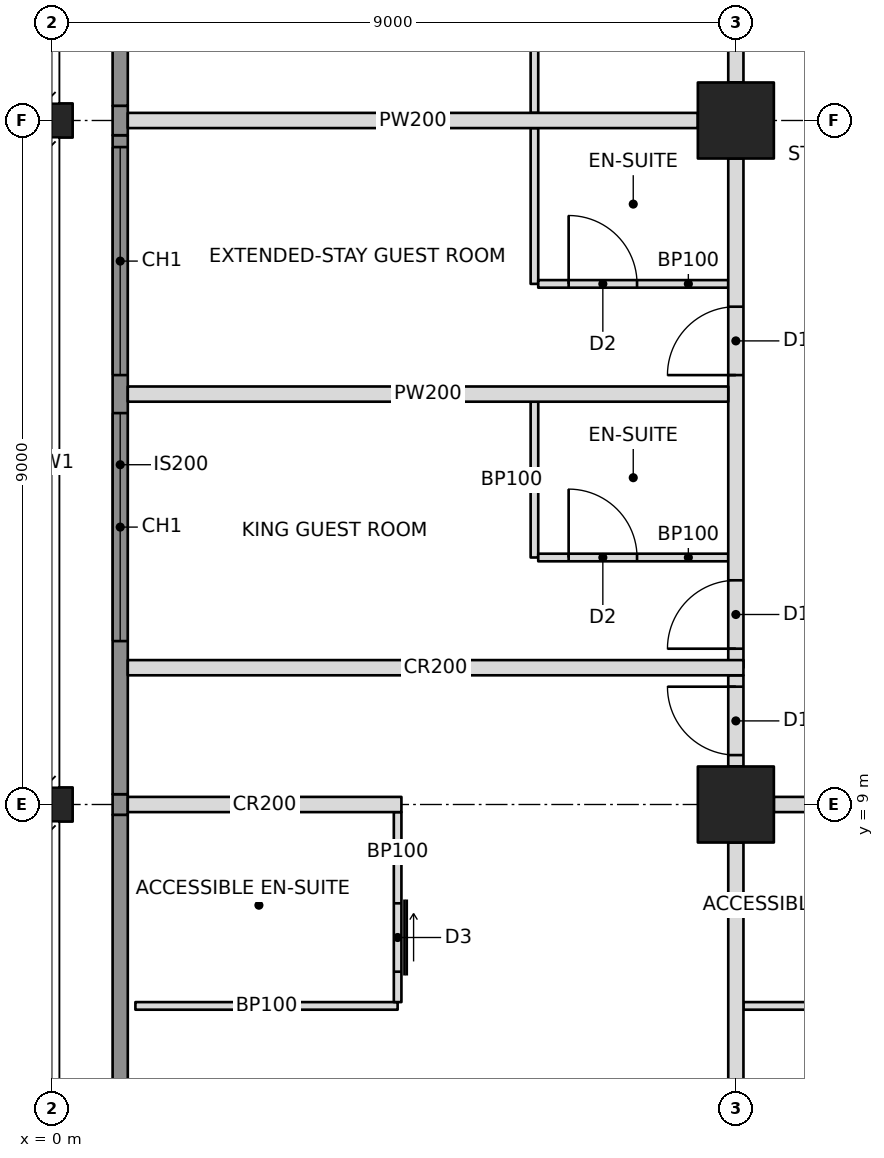
"""IFC4 building model, lengths in metres.
Left out: names, types, materials, properties, quantities, classifications, styles, units other than length and angle.
Written with IfcOpenShell. Run it as: python <this file> out.ifc"""

import sys

from ifc_helpers import new_model, si_unit, direction, frame, frame_2d, origin, origin_2d, place, context, subcontext, project, spatial, rectangle, hollow_rectangle, i_section, extrude, element, fill, save


model = new_model("IFC4")
c1 = context("Model", 3, precision=1e-05, world=origin(), true_north=direction((0.0, 1.0)))
c2 = subcontext(c1, "Body", "Model", "MODEL_VIEW")
j1 = project(units=[si_unit("LENGTHUNIT", "METRE"), si_unit("PLANEANGLEUNIT", "RADIAN")], contexts=[c1])
p1 = place(None, origin())
s1 = spatial("IfcSite", under=j1, at=p1, CompositionType="ELEMENT")
p2 = place(p1, origin())
s2 = spatial("IfcBuilding", under=s1, at=p2, CompositionType="ELEMENT")
p3 = place(p2, frame((0.0, 0.0, 163.8)))
s3 = spatial("IfcBuildingStorey", under=s2, at=p3, CompositionType="ELEMENT", Elevation=163.8)
for number, where, z_axis, x_axis in (
    (1, (0.0, 9.0, 0.0), (0.0, 0.0, 1.0), (0.0, 1.0, 0.0)),
    (2, (0.0, 18.0, 0.0), (0.0, 0.0, 1.0), (0.0, 1.0, 0.0)),
):
    element("IfcColumn", number, at=place(p3, frame(where, z_axis=z_axis, x_axis=x_axis)), inside=s3, PredefinedType="COLUMN", context=c2, shape_type="SweptSolid", body=[
        extrude(i_section(OverallWidth=0.449, OverallDepth=0.549, WebThickness=0.072, FlangeThickness=0.115, at=origin_2d()), origin(), (0.0, 0.0, 1.0), 3.4),
    ])
for number, where, z_axis, x_axis in (
    (3, (9.0, 9.0, 0.0), (0.0, 0.0, 1.0), (1.0, 0.0, 0.0)),
    (4, (9.0, 18.0, 0.0), (0.0, 0.0, 1.0), (1.0, 0.0, 0.0)),
):
    element("IfcColumn", number, at=place(p3, frame(where, z_axis=z_axis, x_axis=x_axis)), inside=s3, PredefinedType="COLUMN", context=c2, shape_type="SweptSolid", body=[
        extrude(hollow_rectangle(XDim=1.0, YDim=1.0, WallThickness=0.1, at=origin_2d()), origin(), (0.0, 0.0, 1.0), 3.4),
    ])
p4 = place(p3, frame((1.0, 9.0, 0.0), z_axis=(0.0, 0.0, 1.0), x_axis=(1.0, 0.0, 0.0)))
e5 = element("IfcWall", 5, at=p4, inside=s3, PredefinedType="PARTITIONING", context=c2, shape_type="SweptSolid", body=[
    extrude(rectangle(XDim=3.6, YDim=0.2, at=frame_2d((1.8, 0.0))), origin(), (0.0, 0.0, 1.0), 2.438),
])
p5 = place(p3, frame((9.5, 9.0, 0.0), z_axis=(0.0, 0.0, 1.0), x_axis=(1.0, 0.0, 0.0)))
e6 = element("IfcWall", 6, at=p5, inside=s3, PredefinedType="PARTITIONING", context=c2, shape_type="SweptSolid", body=[
    extrude(rectangle(XDim=8.0, YDim=0.2, at=frame_2d((4.0, 0.0))), origin(), (0.0, 0.0, 1.0), 2.405),
])
p6 = place(p5, frame((2.85, 0.0, 0.0)))
e7 = element("IfcOpeningElement", 7, at=p6, cuts=e6, PredefinedType="OPENING", context=c2, shape_type="SweptSolid", body=[
    extrude(rectangle(XDim=0.9, YDim=2.1, at=frame_2d((0.45, 1.05))), frame((0.0, 0.11, 0.0), z_axis=(0.0, -1.0, 0.0), x_axis=(1.0, 0.0, 0.0)), (0.0, 0.0, 1.0), 0.22),
])
p7 = place(p5, frame((4.25, 0.0, 0.0)))
e8 = element("IfcOpeningElement", 8, at=p7, cuts=e6, PredefinedType="OPENING", context=c2, shape_type="SweptSolid", body=[
    extrude(rectangle(XDim=0.9, YDim=2.1, at=frame_2d((0.45, 1.05))), frame((0.0, 0.11, 0.0), z_axis=(0.0, -1.0, 0.0), x_axis=(1.0, 0.0, 0.0)), (0.0, 0.0, 1.0), 0.22),
])
p8 = place(p3, frame((9.0, 10.8, 0.0), z_axis=(0.0, 0.0, 1.0), x_axis=(0.0, 1.0, 0.0)))
e9 = element("IfcWall", 9, at=p8, inside=s3, PredefinedType="PARTITIONING", context=c2, shape_type="SweptSolid", body=[
    extrude(rectangle(XDim=6.7, YDim=0.2, at=frame_2d((3.35, 0.0))), origin(), (0.0, 0.0, 1.0), 2.405),
])
p9 = place(p8, frame((0.25, 0.0, 0.0)))
e10 = element("IfcOpeningElement", 10, at=p9, cuts=e9, PredefinedType="OPENING", context=c2, shape_type="SweptSolid", body=[
    extrude(rectangle(XDim=0.9, YDim=2.1, at=frame_2d((0.45, 1.05))), frame((0.0, 0.11, 0.0), z_axis=(0.0, -1.0, 0.0), x_axis=(1.0, 0.0, 0.0)), (0.0, 0.0, 1.0), 0.22),
])
p10 = place(p8, frame((3.85, 0.0, 0.0)))
e11 = element("IfcOpeningElement", 11, at=p10, cuts=e9, PredefinedType="OPENING", context=c2, shape_type="SweptSolid", body=[
    extrude(rectangle(XDim=0.9, YDim=2.1, at=frame_2d((0.45, 1.05))), frame((0.0, 0.11, 0.0), z_axis=(0.0, -1.0, 0.0), x_axis=(1.0, 0.0, 0.0)), (0.0, 0.0, 1.0), 0.22),
])
p11 = place(p3, frame((9.0, 18.5, 0.0), z_axis=(0.0, 0.0, 1.0), x_axis=(0.0, 1.0, 0.0)))
e12 = element("IfcWall", 12, at=p11, inside=s3, PredefinedType="PARTITIONING", context=c2, shape_type="SweptSolid", body=[
    extrude(rectangle(XDim=8.1, YDim=0.2, at=frame_2d((4.05, 0.0))), origin(), (0.0, 0.0, 1.0), 2.405),
])
p12 = place(p11, frame((5.55, 0.0, 0.0)))
e13 = element("IfcOpeningElement", 13, at=p12, cuts=e12, PredefinedType="OPENING", context=c2, shape_type="SweptSolid", body=[
    extrude(rectangle(XDim=0.9, YDim=2.1, at=frame_2d((0.45, 1.05))), frame((0.0, 0.11, 0.0), z_axis=(0.0, -1.0, 0.0), x_axis=(1.0, 0.0, 0.0)), (0.0, 0.0, 1.0), 0.22),
])
p13 = place(p3, frame((1.0, 10.8, 0.0), z_axis=(0.0, 0.0, 1.0), x_axis=(1.0, 0.0, 0.0)))
e14 = element("IfcWall", 14, at=p13, inside=s3, PredefinedType="PARTITIONING", context=c2, shape_type="SweptSolid", body=[
    extrude(rectangle(XDim=8.1, YDim=0.2, at=frame_2d((4.05, 0.0))), origin(), (0.0, 0.0, 1.0), 2.404),
])
p14 = place(p3, frame((9.0, 8.5, 0.0), z_axis=(0.0, 0.0, 1.0), x_axis=(0.0, -1.0, 0.0)))
e15 = element("IfcWall", 15, at=p14, inside=s3, PredefinedType="PARTITIONING", context=c2, shape_type="SweptSolid", body=[
    extrude(rectangle(XDim=7.5, YDim=0.2, at=frame_2d((3.75, 0.0))), origin(), (0.0, 0.0, 1.0), 2.438),
])
p15 = place(p3, frame((1.1, 6.35, 0.0), z_axis=(0.0, 0.0, 1.0), x_axis=(1.0, 0.0, 0.0)))
e16 = element("IfcWall", 16, at=p15, inside=s3, PredefinedType="PARTITIONING", context=c2, shape_type="SweptSolid", body=[
    extrude(rectangle(XDim=3.45, YDim=0.1, at=frame_2d((1.725, 0.0))), origin(), (0.0, 0.0, 1.0), 3.2),
])
p16 = place(p3, frame((4.55, 8.9, 0.0), z_axis=(0.0, 0.0, 1.0), x_axis=(0.0, -1.0, 0.0)))
e17 = element("IfcWall", 17, at=p16, inside=s3, PredefinedType="PARTITIONING", context=c2, shape_type="SweptSolid", body=[
    extrude(rectangle(XDim=2.5, YDim=0.1, at=frame_2d((1.25, 0.0))), origin(), (0.0, 0.0, 1.0), 2.438),
])
p17 = place(p16, frame((1.2, 0.0, 0.0)))
e18 = element("IfcOpeningElement", 18, at=p17, cuts=e17, PredefinedType="OPENING", context=c2, shape_type="SweptSolid", body=[
    extrude(rectangle(XDim=0.9, YDim=2.1, at=frame_2d((0.45, 1.05))), frame((0.0, 0.06, 0.0), z_axis=(0.0, -1.0, 0.0), x_axis=(1.0, 0.0, 0.0)), (0.0, 0.0, 1.0), 0.12),
])
p18 = place(p3, frame((9.1, 6.35, 0.0), z_axis=(0.0, 0.0, 1.0), x_axis=(1.0, 0.0, 0.0)))
e19 = element("IfcWall", 19, at=p18, inside=s3, PredefinedType="PARTITIONING", context=c2, shape_type="SweptSolid", body=[
    extrude(rectangle(XDim=2.95, YDim=0.1, at=frame_2d((1.475, 0.0))), origin(), (0.0, 0.0, 1.0), 2.438),
])
p19 = place(p3, frame((8.9, 14.4, 0.0), z_axis=(0.0, 0.0, 1.0), x_axis=(-1.0, 0.0, 0.0)))
e20 = element("IfcWall", 20, at=p19, inside=s3, PredefinedType="PARTITIONING", context=c2, shape_type="SweptSolid", body=[
    extrude(rectangle(XDim=7.9, YDim=0.2, at=frame_2d((3.95, 0.0))), origin(), (0.0, 0.0, 1.0), 2.404),
])
p20 = place(p3, frame((8.5, 18.0, 0.0), z_axis=(0.0, 0.0, 1.0), x_axis=(-1.0, 0.0, 0.0)))
e21 = element("IfcWall", 21, at=p20, inside=s3, PredefinedType="PARTITIONING", context=c2, shape_type="SweptSolid", body=[
    extrude(rectangle(XDim=7.5, YDim=0.2, at=frame_2d((3.75, 0.0))), origin(), (0.0, 0.0, 1.0), 2.405),
])
p21 = place(p3, frame((6.35, 12.25, 0.0), z_axis=(0.0, 0.0, 1.0), x_axis=(0.0, 1.0, 0.0)))
e22 = element("IfcWall", 22, at=p21, inside=s3, PredefinedType="PARTITIONING", context=c2, shape_type="SweptSolid", body=[
    extrude(rectangle(XDim=2.05, YDim=0.1, at=frame_2d((1.025, 0.0))), origin(), (0.0, 0.0, 1.0), 3.2),
])
p22 = place(p3, frame((8.9, 12.25, 0.0), z_axis=(0.0, 0.0, 1.0), x_axis=(-1.0, 0.0, 0.0)))
e23 = element("IfcWall", 23, at=p22, inside=s3, PredefinedType="PARTITIONING", context=c2, shape_type="SweptSolid", body=[
    extrude(rectangle(XDim=2.5, YDim=0.1, at=frame_2d((1.25, 0.0))), origin(), (0.0, 0.0, 1.0), 2.404),
])
p23 = place(p22, frame((1.2, 0.0, 0.0)))
e24 = element("IfcOpeningElement", 24, at=p23, cuts=e23, PredefinedType="OPENING", context=c2, shape_type="SweptSolid", body=[
    extrude(rectangle(XDim=0.9, YDim=2.1, at=frame_2d((0.45, 1.05))), frame((0.0, 0.06, 0.0), z_axis=(0.0, -1.0, 0.0), x_axis=(1.0, 0.0, 0.0)), (0.0, 0.0, 1.0), 0.12),
])
p24 = place(p3, frame((6.35, 15.85, 0.0), z_axis=(0.0, 0.0, 1.0), x_axis=(0.0, 1.0, 0.0)))
e25 = element("IfcWall", 25, at=p24, inside=s3, PredefinedType="PARTITIONING", context=c2, shape_type="SweptSolid", body=[
    extrude(rectangle(XDim=2.05, YDim=0.1, at=frame_2d((1.025, 0.0))), origin(), (0.0, 0.0, 1.0), 2.404),
])
p25 = place(p3, frame((8.9, 15.85, 0.0), z_axis=(0.0, 0.0, 1.0), x_axis=(-1.0, 0.0, 0.0)))
e26 = element("IfcWall", 26, at=p25, inside=s3, PredefinedType="PARTITIONING", context=c2, shape_type="SweptSolid", body=[
    extrude(rectangle(XDim=2.5, YDim=0.1, at=frame_2d((1.25, 0.0))), origin(), (0.0, 0.0, 1.0), 2.404),
])
p26 = place(p25, frame((1.2, 0.0, 0.0)))
e27 = element("IfcOpeningElement", 27, at=p26, cuts=e26, PredefinedType="OPENING", context=c2, shape_type="SweptSolid", body=[
    extrude(rectangle(XDim=0.9, YDim=2.1, at=frame_2d((0.45, 1.05))), frame((0.0, 0.06, 0.0), z_axis=(0.0, -1.0, 0.0), x_axis=(1.0, 0.0, 0.0)), (0.0, 0.0, 1.0), 0.12),
])
p27 = place(p3, frame((6.35, 18.1, 0.0), z_axis=(0.0, 0.0, 1.0), x_axis=(0.0, 1.0, 0.0)))
e28 = element("IfcWall", 28, at=p27, inside=s3, PredefinedType="PARTITIONING", context=c2, shape_type="SweptSolid", body=[
    extrude(rectangle(XDim=3.45, YDim=0.1, at=frame_2d((1.725, 0.0))), origin(), (0.0, 0.0, 1.0), 2.404),
])
p28 = place(p3, frame((9.0, 9.5, 0.0), z_axis=(0.0, 0.0, 1.0), x_axis=(0.0, 1.0, 0.0)))
e29 = element("IfcWall", 29, at=p28, inside=s3, PredefinedType="PARTITIONING", context=c2, shape_type="SweptSolid", body=[
    extrude(rectangle(XDim=1.2, YDim=0.2, at=frame_2d((0.6, 0.0))), origin(), (0.0, 0.0, 1.0), 2.405),
])
p29 = place(p28, frame((0.15, 0.0, 0.0)))
e30 = element("IfcOpeningElement", 30, at=p29, cuts=e29, PredefinedType="OPENING", context=c2, shape_type="SweptSolid", body=[
    extrude(rectangle(XDim=0.9, YDim=2.1, at=frame_2d((0.45, 1.05))), frame((0.0, 0.11, 0.0), z_axis=(0.0, -1.0, 0.0), x_axis=(1.0, 0.0, 0.0)), (0.0, 0.0, 1.0), 0.22),
])
p30 = place(p3, frame((0.9, 4.607, 0.0), z_axis=(0.0, 0.0, 1.0), x_axis=(0.0, 1.0, 0.0)))
e31 = element("IfcWall", 31, at=p30, inside=s3, PredefinedType="SOLIDWALL", context=c2, shape_type="SweptSolid", body=[
    extrude(rectangle(XDim=4.257, YDim=0.2, at=frame_2d((2.129, 0.0))), origin(), (0.0, 0.0, 1.0), 3.2),
])
p31 = place(p3, frame((0.9, 8.865, 0.0), z_axis=(0.0, 0.0, 1.0), x_axis=(0.0, 1.0, 0.0)))
e32 = element("IfcWall", 32, at=p31, inside=s3, PredefinedType="SOLIDWALL", context=c2, shape_type="SweptSolid", body=[
    extrude(rectangle(XDim=0.271, YDim=0.2, at=frame_2d((0.135, 0.0))), origin(), (0.0, 0.0, 1.0), 2.438),
])
p32 = place(p3, frame((0.9, 9.135, 0.0), z_axis=(0.0, 0.0, 1.0), x_axis=(0.0, 1.0, 0.0)))
e33 = element("IfcWall", 33, at=p32, inside=s3, PredefinedType="SOLIDWALL", context=c2, shape_type="SweptSolid", body=[
    extrude(rectangle(XDim=8.671, YDim=0.2, at=frame_2d((4.335, 0.0))), origin(), (0.0, 0.0, 1.0), 3.2),
])
p33 = place(p32, frame((2.015, 0.0, 0.6)))
e34 = element("IfcOpeningElement", 34, at=p33, cuts=e33, PredefinedType="OPENING", context=c2, shape_type="SweptSolid", body=[
    extrude(rectangle(XDim=3.0, YDim=2.2, at=frame_2d((1.5, 1.1))), frame((0.0, 0.11, 0.0), z_axis=(0.0, -1.0, 0.0), x_axis=(1.0, 0.0, 0.0)), (0.0, 0.0, 1.0), 0.22),
])
p34 = place(p32, frame((5.515, 0.0, 0.6)))
e35 = element("IfcOpeningElement", 35, at=p34, cuts=e33, PredefinedType="OPENING", context=c2, shape_type="SweptSolid", body=[
    extrude(rectangle(XDim=3.0, YDim=2.2, at=frame_2d((1.5, 1.1))), frame((0.0, 0.11, 0.0), z_axis=(0.0, -1.0, 0.0), x_axis=(1.0, 0.0, 0.0)), (0.0, 0.0, 1.0), 0.22),
])
p35 = place(p3, frame((0.9, 17.806, 0.0), z_axis=(0.0, 0.0, 1.0), x_axis=(0.0, 1.0, 0.0)))
e36 = element("IfcWall", 36, at=p35, inside=s3, PredefinedType="SOLIDWALL", context=c2, shape_type="SweptSolid", body=[
    extrude(rectangle(XDim=0.388, YDim=0.2, at=frame_2d((0.194, 0.0))), origin(), (0.0, 0.0, 1.0), 2.404),
])
p36 = place(p3, frame((0.9, 18.194, 0.0), z_axis=(0.0, 0.0, 1.0), x_axis=(0.0, 1.0, 0.0)))
e37 = element("IfcWall", 37, at=p36, inside=s3, PredefinedType="SOLIDWALL", context=c2, shape_type="SweptSolid", body=[
    extrude(rectangle(XDim=5.806, YDim=0.2, at=frame_2d((2.903, 0.0))), origin(), (0.0, 0.0, 1.0), 3.2),
])
p37 = place(p36, frame((1.356, 0.0, 0.6)))
e38 = element("IfcOpeningElement", 38, at=p37, cuts=e37, PredefinedType="OPENING", context=c2, shape_type="SweptSolid", body=[
    extrude(rectangle(XDim=3.0, YDim=2.2, at=frame_2d((1.5, 1.1))), frame((0.0, 0.11, 0.0), z_axis=(0.0, -1.0, 0.0), x_axis=(1.0, 0.0, 0.0)), (0.0, 0.0, 1.0), 0.22),
])
p38 = place(p33, origin())
e39 = element("IfcWindow", 39, at=p38, inside=s3, PartitioningType="TRIPLE_PANEL_VERTICAL", PredefinedType="WINDOW", context=c2, shape_type="SweptSolid", body=[
    extrude(rectangle(XDim=3.0, YDim=2.2, at=frame_2d((1.5, 1.1))), frame((0.0, 0.03, 0.0), z_axis=(0.0, -1.0, 0.0), x_axis=(1.0, 0.0, 0.0)), (0.0, 0.0, 1.0), 0.06),
])
fill(e34, e39)
p39 = place(p34, origin())
e40 = element("IfcWindow", 40, at=p39, inside=s3, PartitioningType="TRIPLE_PANEL_VERTICAL", PredefinedType="WINDOW", context=c2, shape_type="SweptSolid", body=[
    extrude(rectangle(XDim=3.0, YDim=2.2, at=frame_2d((1.5, 1.1))), frame((0.0, 0.03, 0.0), z_axis=(0.0, -1.0, 0.0), x_axis=(1.0, 0.0, 0.0)), (0.0, 0.0, 1.0), 0.06),
])
fill(e35, e40)
p40 = place(p17, origin())
e41 = element("IfcDoor", 41, at=p40, inside=s3, OperationType="SLIDING_TO_LEFT", PredefinedType="DOOR", context=c2, shape_type="SweptSolid", body=[
    extrude(rectangle(XDim=0.9, YDim=2.1, at=frame_2d((0.45, 1.05))), frame((0.0, 0.025, 0.0), z_axis=(0.0, -1.0, 0.0), x_axis=(1.0, 0.0, 0.0)), (0.0, 0.0, 1.0), 0.05),
])
fill(e18, e41)
p41 = place(p23, frame((0.9, 0.0, 0.0), z_axis=(0.0, 0.0, 1.0), x_axis=(-1.0, 0.0, 0.0)))
e42 = element("IfcDoor", 42, at=p41, inside=s3, OperationType="SINGLE_SWING_LEFT", PredefinedType="DOOR", context=c2, shape_type="SweptSolid", body=[
    extrude(rectangle(XDim=0.9, YDim=2.1, at=frame_2d((0.45, 1.05))), frame((0.0, 0.025, 0.0), z_axis=(0.0, -1.0, 0.0), x_axis=(1.0, 0.0, 0.0)), (0.0, 0.0, 1.0), 0.05),
])
fill(e24, e42)
p42 = place(p9, origin())
e43 = element("IfcDoor", 43, at=p42, inside=s3, OperationType="SINGLE_SWING_LEFT", PredefinedType="DOOR", context=c2, shape_type="SweptSolid", body=[
    extrude(rectangle(XDim=0.9, YDim=2.1, at=frame_2d((0.45, 1.05))), frame((0.0, 0.025, 0.0), z_axis=(0.0, -1.0, 0.0), x_axis=(1.0, 0.0, 0.0)), (0.0, 0.0, 1.0), 0.05),
])
fill(e10, e43)
p43 = place(p26, frame((0.9, 0.0, 0.0), z_axis=(0.0, 0.0, 1.0), x_axis=(-1.0, 0.0, 0.0)))
e44 = element("IfcDoor", 44, at=p43, inside=s3, OperationType="SINGLE_SWING_LEFT", PredefinedType="DOOR", context=c2, shape_type="SweptSolid", body=[
    extrude(rectangle(XDim=0.9, YDim=2.1, at=frame_2d((0.45, 1.05))), frame((0.0, 0.025, 0.0), z_axis=(0.0, -1.0, 0.0), x_axis=(1.0, 0.0, 0.0)), (0.0, 0.0, 1.0), 0.05),
])
fill(e27, e44)
p44 = place(p10, origin())
e45 = element("IfcDoor", 45, at=p44, inside=s3, OperationType="SINGLE_SWING_LEFT", PredefinedType="DOOR", context=c2, shape_type="SweptSolid", body=[
    extrude(rectangle(XDim=0.9, YDim=2.1, at=frame_2d((0.45, 1.05))), frame((0.0, 0.025, 0.0), z_axis=(0.0, -1.0, 0.0), x_axis=(1.0, 0.0, 0.0)), (0.0, 0.0, 1.0), 0.05),
])
fill(e11, e45)
p45 = place(p29, origin())
e46 = element("IfcDoor", 46, at=p45, inside=s3, OperationType="SINGLE_SWING_RIGHT", PredefinedType="DOOR", context=c2, shape_type="SweptSolid", body=[
    extrude(rectangle(XDim=0.9, YDim=2.1, at=frame_2d((0.45, 1.05))), frame((0.0, 0.025, 0.0), z_axis=(0.0, -1.0, 0.0), x_axis=(1.0, 0.0, 0.0)), (0.0, 0.0, 1.0), 0.05),
])
fill(e30, e46)
save(model, sys.argv[1])
